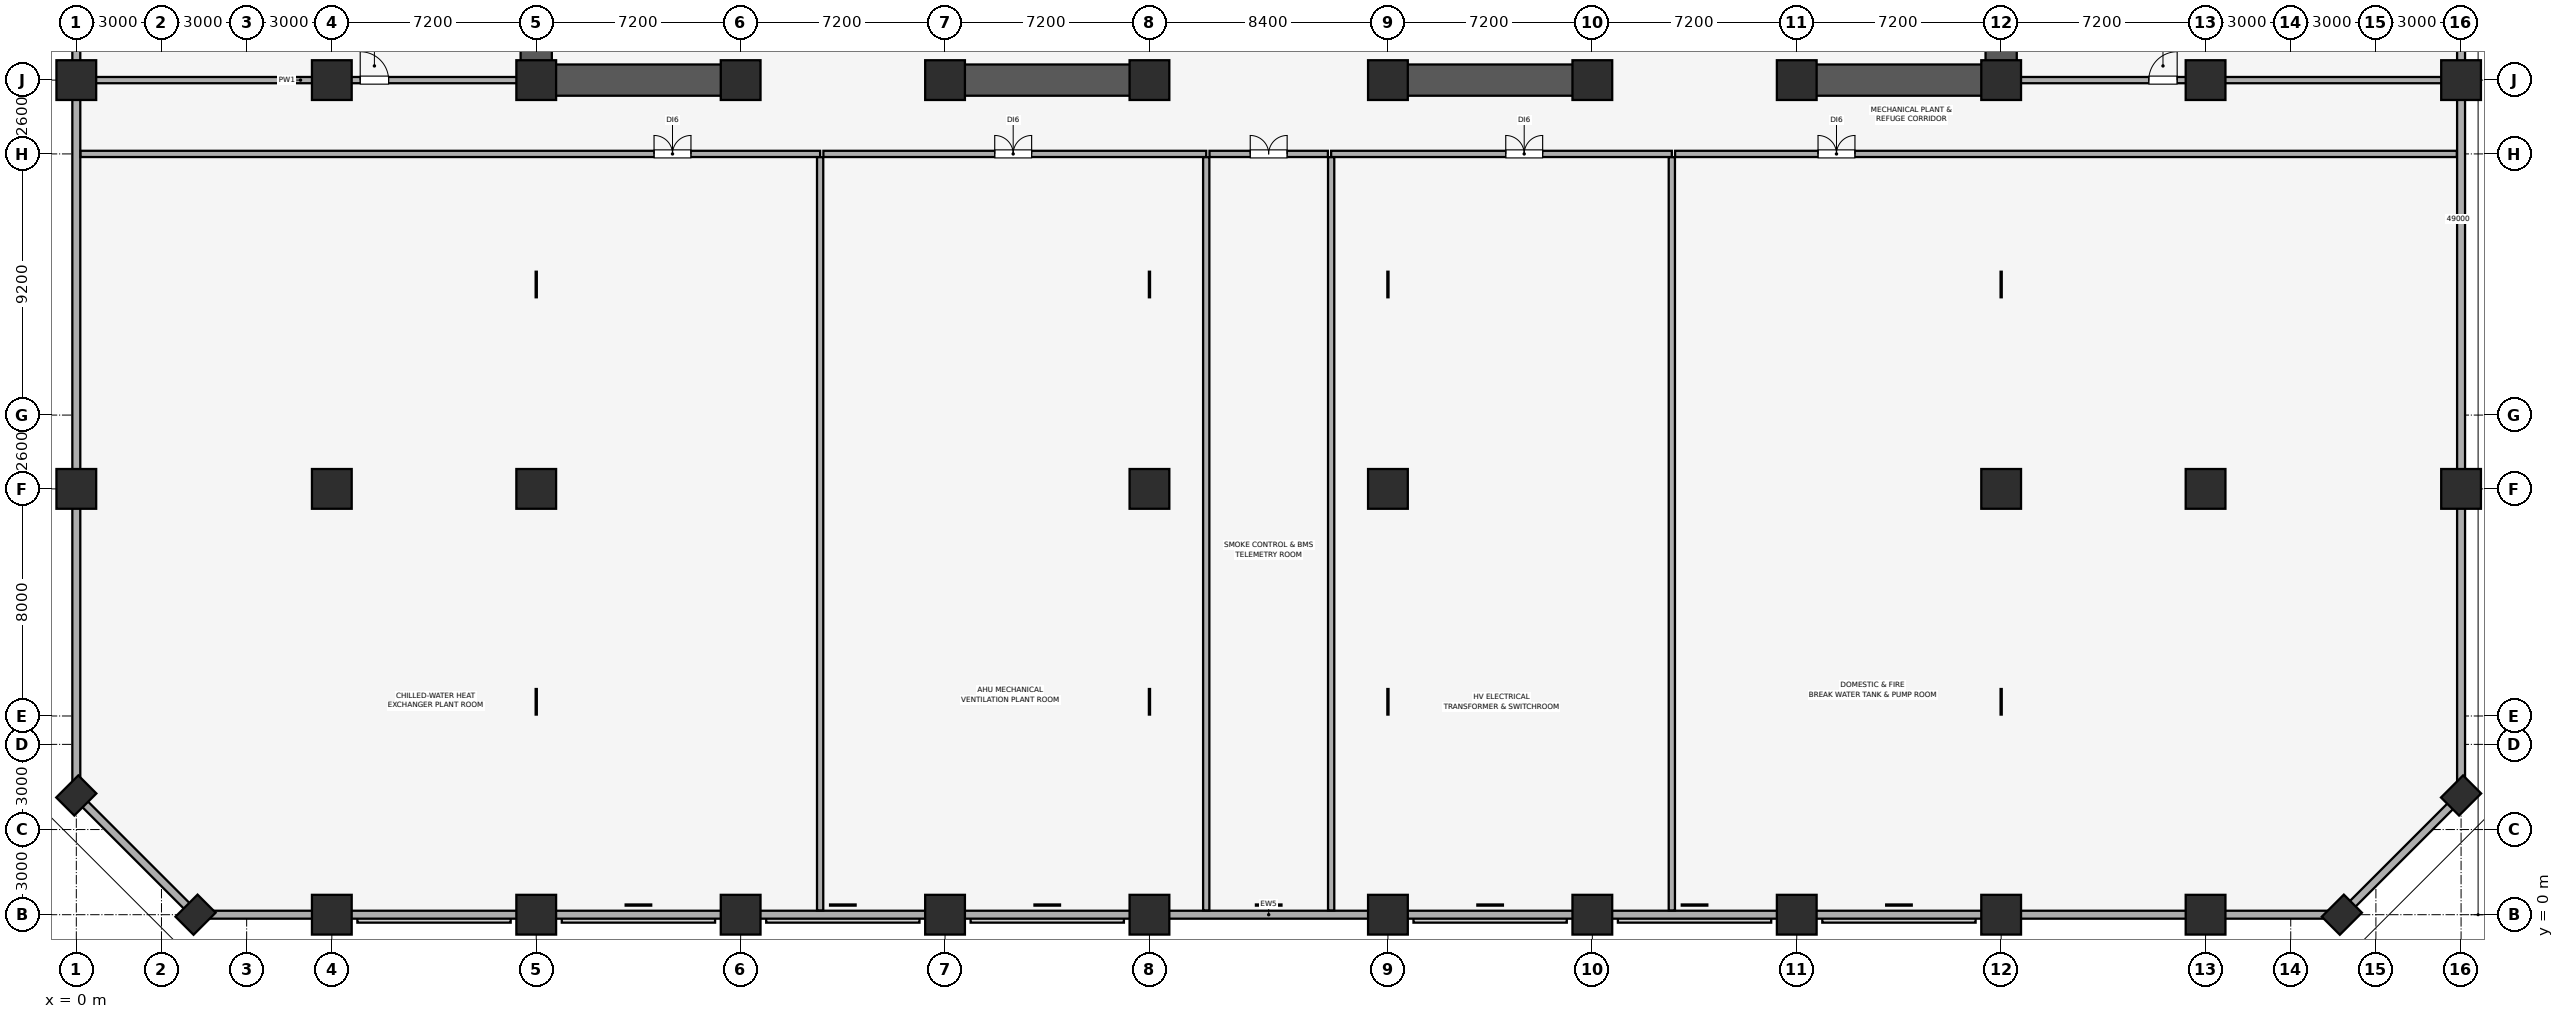
"""IFC4 building model, lengths in metres.
Left out: names, types, materials, properties, quantities, classifications, styles, units other than length and angle.
Written with IfcOpenShell. Run it as: python <this file> out.ifc"""

import sys

from ifc_helpers import new_model, si_unit, direction, frame, frame_2d, origin, origin_2d, place, context, subcontext, project, spatial, rectangle, extrude, element, fill, save


model = new_model("IFC4")
c1 = context("Model", 3, precision=1e-05, world=origin(), true_north=direction((0.0, 1.0)))
c2 = subcontext(c1, "Body", "Model", "MODEL_VIEW")
j1 = project(units=[si_unit("LENGTHUNIT", "METRE"), si_unit("PLANEANGLEUNIT", "RADIAN")], contexts=[c1])
p1 = place(None, origin())
s1 = spatial("IfcSite", under=j1, at=p1, CompositionType="ELEMENT")
p2 = place(p1, origin())
s2 = spatial("IfcBuilding", under=s1, at=p2, CompositionType="ELEMENT")
p3 = place(p2, frame((0.0, 0.0, 80.15)))
s3 = spatial("IfcBuildingStorey", under=s2, at=p3, CompositionType="ELEMENT", Elevation=80.15)
for number, where, z_axis, x_axis in (
    (1, (9.0, 0.0, 0.0), (0.0, 0.0, 1.0), (1.0, 0.0, 0.0)),
    (2, (16.2, 0.0, 0.0), (0.0, 0.0, 1.0), (1.0, 0.0, 0.0)),
    (3, (23.4, 0.0, 0.0), (0.0, 0.0, 1.0), (1.0, 0.0, 0.0)),
    (4, (30.6, 0.0, 0.0), (0.0, 0.0, 1.0), (1.0, 0.0, 0.0)),
    (5, (37.8, 0.0, 0.0), (0.0, 0.0, 1.0), (1.0, 0.0, 0.0)),
    (6, (46.2, 0.0, 0.0), (0.0, 0.0, 1.0), (1.0, 0.0, 0.0)),
    (7, (53.4, 0.0, 0.0), (0.0, 0.0, 1.0), (1.0, 0.0, 0.0)),
    (8, (60.6, 0.0, 0.0), (0.0, 0.0, 1.0), (1.0, 0.0, 0.0)),
    (9, (67.8, 0.0, 0.0), (0.0, 0.0, 1.0), (1.0, 0.0, 0.0)),
    (10, (75.0, 0.0, 0.0), (0.0, 0.0, 1.0), (1.0, 0.0, 0.0)),
    (11, (0.0, 15.0, 0.0), (0.0, 0.0, 1.0), (1.0, 0.0, 0.0)),
    (12, (84.0, 15.0, 0.0), (0.0, 0.0, 1.0), (1.0, 0.0, 0.0)),
    (13, (0.0, 29.4, 0.0), (0.0, 0.0, 1.0), (1.0, 0.0, 0.0)),
    (14, (84.0, 29.4, 0.0), (0.0, 0.0, 1.0), (1.0, 0.0, 0.0)),
):
    element("IfcColumn", number, at=place(p3, frame(where, z_axis=z_axis, x_axis=x_axis)), inside=s3, PredefinedType="COLUMN", context=c2, shape_type="SweptSolid", body=[
        extrude(rectangle(XDim=1.4, YDim=1.4, at=origin_2d()), origin(), (0.0, 0.0, 1.0), 5.16),
    ])
for number, where, z_axis, x_axis in (
    (15, (4.2, 0.0, 0.0), (0.0, 0.0, 1.0), (0.707, 0.707, 0.0)),
    (16, (79.8, 0.0, 0.0), (0.0, 0.0, 1.0), (0.707, 0.707, 0.0)),
    (17, (84.0, 4.2, 0.0), (0.0, 0.0, 1.0), (0.707, 0.707, 0.0)),
    (18, (0.0, 4.2, 0.0), (0.0, 0.0, 1.0), (0.707, 0.707, 0.0)),
):
    element("IfcColumn", number, at=place(p3, frame(where, z_axis=z_axis, x_axis=x_axis)), inside=s3, PredefinedType="PILASTER", context=c2, shape_type="SweptSolid", body=[
        extrude(rectangle(XDim=1.1, YDim=0.9, at=origin_2d()), origin(), (0.0, 0.0, 1.0), 5.16),
    ])
for number, where, z_axis, x_axis in (
    (19, (9.0, 15.0, 0.0), (0.0, 0.0, 1.0), (1.0, 0.0, 0.0)),
    (20, (16.2, 15.0, 0.0), (0.0, 0.0, 1.0), (1.0, 0.0, 0.0)),
    (21, (37.8, 15.0, 0.0), (0.0, 0.0, 1.0), (1.0, 0.0, 0.0)),
    (22, (46.2, 15.0, 0.0), (0.0, 0.0, 1.0), (1.0, 0.0, 0.0)),
    (23, (67.8, 15.0, 0.0), (0.0, 0.0, 1.0), (1.0, 0.0, 0.0)),
    (24, (75.0, 15.0, 0.0), (0.0, 0.0, 1.0), (1.0, 0.0, 0.0)),
    (25, (9.0, 29.4, 0.0), (0.0, 0.0, 1.0), (1.0, 0.0, 0.0)),
    (26, (16.2, 29.4, 0.0), (0.0, 0.0, 1.0), (1.0, 0.0, 0.0)),
    (27, (23.4, 29.4, 0.0), (0.0, 0.0, 1.0), (1.0, 0.0, 0.0)),
    (28, (30.6, 29.4, 0.0), (0.0, 0.0, 1.0), (1.0, 0.0, 0.0)),
    (29, (37.8, 29.4, 0.0), (0.0, 0.0, 1.0), (1.0, 0.0, 0.0)),
    (30, (46.2, 29.4, 0.0), (0.0, 0.0, 1.0), (1.0, 0.0, 0.0)),
    (31, (53.4, 29.4, 0.0), (0.0, 0.0, 1.0), (1.0, 0.0, 0.0)),
    (32, (60.6, 29.4, 0.0), (0.0, 0.0, 1.0), (1.0, 0.0, 0.0)),
    (33, (67.8, 29.4, 0.0), (0.0, 0.0, 1.0), (1.0, 0.0, 0.0)),
    (34, (75.0, 29.4, 0.0), (0.0, 0.0, 1.0), (1.0, 0.0, 0.0)),
):
    element("IfcColumn", number, at=place(p3, frame(where, z_axis=z_axis, x_axis=x_axis)), inside=s3, PredefinedType="COLUMN", context=c2, shape_type="SweptSolid", body=[
        extrude(rectangle(XDim=1.4, YDim=1.4, at=origin_2d()), origin(), (0.0, 0.0, 1.0), 5.16),
    ])
p4 = place(p3, frame((4.2, 0.0, 0.0), z_axis=(0.0, 0.0, 1.0), x_axis=(1.0, 0.0, 0.0)))
e35 = element("IfcWall", 35, at=p4, inside=s3, PredefinedType="SOLIDWALL", context=c2, shape_type="SweptSolid", body=[
    extrude(rectangle(XDim=75.6, YDim=0.28, at=frame_2d((37.8, 0.0))), origin(), (0.0, 0.0, 1.0), 4.21),
])
p5 = place(p3, frame((79.8, 0.0, 0.0), z_axis=(0.0, 0.0, 1.0), x_axis=(0.707106781187, 0.707106781187, 0.0)))
e36 = element("IfcWall", 36, at=p5, inside=s3, PredefinedType="SOLIDWALL", context=c2, shape_type="SweptSolid", body=[
    extrude(rectangle(XDim=5.94, YDim=0.28, at=frame_2d((2.97, 0.0))), origin(), (0.0, 0.0, 1.0), 4.21),
])
for number, where, z_axis, x_axis in (
    (37, (84.0, 4.2, 0.0), (0.0, 0.0, 1.0), (0.0, 1.0, 0.0)),
    (38, (0.0, 44.8, 0.0), (0.0, 0.0, 1.0), (0.0, -1.0, 0.0)),
):
    element("IfcWall", number, at=place(p3, frame(where, z_axis=z_axis, x_axis=x_axis)), inside=s3, PredefinedType="SOLIDWALL", context=c2, shape_type="SweptSolid", body=[
        extrude(rectangle(XDim=40.6, YDim=0.28, at=frame_2d((20.3, 0.0))), origin(), (0.0, 0.0, 1.0), 4.21),
    ])
p6 = place(p3, frame((0.0, 4.2, 0.0), z_axis=(0.0, 0.0, 1.0), x_axis=(0.707106781187, -0.707106781187, 0.0)))
e39 = element("IfcWall", 39, at=p6, inside=s3, PredefinedType="SOLIDWALL", context=c2, shape_type="SweptSolid", body=[
    extrude(rectangle(XDim=5.94, YDim=0.28, at=frame_2d((2.97, 0.0))), origin(), (0.0, 0.0, 1.0), 4.21),
])
for number, where, z_axis, x_axis in (
    (40, (16.2, 29.4, 0.0), (0.0, 0.0, 1.0), (0.0, 1.0, 0.0)),
    (41, (67.8, 29.4, 0.0), (0.0, 0.0, 1.0), (0.0, 1.0, 0.0)),
):
    element("IfcWall", number, at=place(p3, frame(where, z_axis=z_axis, x_axis=x_axis)), inside=s3, PredefinedType="SHEAR", context=c2, shape_type="SweptSolid", body=[
        extrude(rectangle(XDim=19.2, YDim=1.1, at=frame_2d((9.6, 0.0))), origin(), (0.0, 0.0, 1.0), 5.16),
    ])
p7 = place(p3, frame((16.755, 29.4, 0.0), z_axis=(0.0, 0.0, 1.0), x_axis=(1.0, 0.0, 0.0)))
e42 = element("IfcWall", 42, at=p7, inside=s3, PredefinedType="SHEAR", context=c2, shape_type="SweptSolid", body=[
    extrude(rectangle(XDim=6.845, YDim=1.1, at=frame_2d((3.423, 0.0))), origin(), (0.0, 0.0, 1.0), 5.16),
])
for number, where, z_axis, x_axis in (
    (43, (30.4, 29.4, 0.0), (0.0, 0.0, 1.0), (1.0, 0.0, 0.0)),
    (44, (46.0, 29.4, 0.0), (0.0, 0.0, 1.0), (1.0, 0.0, 0.0)),
):
    element("IfcWall", number, at=place(p3, frame(where, z_axis=z_axis, x_axis=x_axis)), inside=s3, PredefinedType="SHEAR", context=c2, shape_type="SweptSolid", body=[
        extrude(rectangle(XDim=7.6, YDim=1.1, at=frame_2d((3.8, 0.0))), origin(), (0.0, 0.0, 1.0), 5.16),
    ])
p8 = place(p3, frame((60.4, 29.4, 0.0), z_axis=(0.0, 0.0, 1.0), x_axis=(1.0, 0.0, 0.0)))
e45 = element("IfcWall", 45, at=p8, inside=s3, PredefinedType="SHEAR", context=c2, shape_type="SweptSolid", body=[
    extrude(rectangle(XDim=6.845, YDim=1.1, at=frame_2d((3.423, 0.0))), origin(), (0.0, 0.0, 1.0), 5.16),
])
p9 = place(p3, frame((0.15, 29.4, 0.0), z_axis=(0.0, 0.0, 1.0), x_axis=(1.0, 0.0, 0.0)))
e46 = element("IfcWall", 46, at=p9, inside=s3, PredefinedType="PARTITIONING", context=c2, shape_type="SweptSolid", body=[
    extrude(rectangle(XDim=15.495, YDim=0.22, at=frame_2d((7.748, 0.0))), origin(), (0.0, 0.0, 1.0), 4.51),
])
p10 = place(p9, frame((9.85, 0.0, 0.0)))
e47 = element("IfcOpeningElement", 47, at=p10, cuts=e46, PredefinedType="OPENING", context=c2, shape_type="SweptSolid", body=[
    extrude(rectangle(XDim=1.0, YDim=2.15, at=frame_2d((0.5, 1.075))), frame((0.0, 0.12, 0.0), z_axis=(0.0, -1.0, 0.0), x_axis=(1.0, 0.0, 0.0)), (0.0, 0.0, 1.0), 0.24),
])
p11 = place(p3, frame((68.355, 29.4, 0.0), z_axis=(0.0, 0.0, 1.0), x_axis=(1.0, 0.0, 0.0)))
e48 = element("IfcWall", 48, at=p11, inside=s3, PredefinedType="PARTITIONING", context=c2, shape_type="SweptSolid", body=[
    extrude(rectangle(XDim=15.495, YDim=0.22, at=frame_2d((7.748, 0.0))), origin(), (0.0, 0.0, 1.0), 4.51),
])
p12 = place(p11, frame((4.645, 0.0, 0.0)))
e49 = element("IfcOpeningElement", 49, at=p12, cuts=e48, PredefinedType="OPENING", context=c2, shape_type="SweptSolid", body=[
    extrude(rectangle(XDim=1.0, YDim=2.15, at=frame_2d((0.5, 1.075))), frame((0.0, 0.12, 0.0), z_axis=(0.0, -1.0, 0.0), x_axis=(1.0, 0.0, 0.0)), (0.0, 0.0, 1.0), 0.24),
])
p13 = place(p3, frame((0.15, 26.8, 0.0), z_axis=(0.0, 0.0, 1.0), x_axis=(1.0, 0.0, 0.0)))
e50 = element("IfcWall", 50, at=p13, inside=s3, PredefinedType="PARTITIONING", context=c2, shape_type="SweptSolid", body=[
    extrude(rectangle(XDim=26.05, YDim=0.22, at=frame_2d((13.025, 0.0))), origin(), (0.0, 0.0, 1.0), 5.16),
])
p14 = place(p13, frame((20.2, 0.0, 0.0)))
e51 = element("IfcOpeningElement", 51, at=p14, cuts=e50, PredefinedType="OPENING", context=c2, shape_type="SweptSolid", body=[
    extrude(rectangle(XDim=1.3, YDim=2.2, at=frame_2d((0.65, 1.1))), frame((0.0, 0.12, 0.0), z_axis=(0.0, -1.0, 0.0), x_axis=(1.0, 0.0, 0.0)), (0.0, 0.0, 1.0), 0.24),
])
p15 = place(p3, frame((26.2, 0.15, 0.0), z_axis=(0.0, 0.0, 1.0), x_axis=(0.0, 1.0, 0.0)))
e52 = element("IfcWall", 52, at=p15, inside=s3, PredefinedType="PARTITIONING", context=c2, shape_type="SweptSolid", body=[
    extrude(rectangle(XDim=26.535, YDim=0.22, at=frame_2d((13.268, 0.0))), origin(), (0.0, 0.0, 1.0), 5.16),
])
p16 = place(p3, frame((26.315, 26.8, 0.0), z_axis=(0.0, 0.0, 1.0), x_axis=(1.0, 0.0, 0.0)))
e53 = element("IfcWall", 53, at=p16, inside=s3, PredefinedType="PARTITIONING", context=c2, shape_type="SweptSolid", body=[
    extrude(rectangle(XDim=13.485, YDim=0.22, at=frame_2d((6.743, 0.0))), origin(), (0.0, 0.0, 1.0), 5.16),
])
p17 = place(p16, frame((6.035, 0.0, 0.0)))
e54 = element("IfcOpeningElement", 54, at=p17, cuts=e53, PredefinedType="OPENING", context=c2, shape_type="SweptSolid", body=[
    extrude(rectangle(XDim=1.3, YDim=2.2, at=frame_2d((0.65, 1.1))), frame((0.0, 0.12, 0.0), z_axis=(0.0, -1.0, 0.0), x_axis=(1.0, 0.0, 0.0)), (0.0, 0.0, 1.0), 0.24),
])
p18 = place(p3, frame((39.8, 0.15, 0.0), z_axis=(0.0, 0.0, 1.0), x_axis=(0.0, 1.0, 0.0)))
e55 = element("IfcWall", 55, at=p18, inside=s3, PredefinedType="PARTITIONING", context=c2, shape_type="SweptSolid", body=[
    extrude(rectangle(XDim=26.535, YDim=0.22, at=frame_2d((13.268, 0.0))), origin(), (0.0, 0.0, 1.0), 5.16),
])
p19 = place(p3, frame((44.2, 26.8, 0.0), z_axis=(0.0, 0.0, 1.0), x_axis=(1.0, 0.0, 0.0)))
e56 = element("IfcWall", 56, at=p19, inside=s3, PredefinedType="PARTITIONING", context=c2, shape_type="SweptSolid", body=[
    extrude(rectangle(XDim=12.0, YDim=0.22, at=frame_2d((6.0, 0.0))), origin(), (0.0, 0.0, 1.0), 5.16),
])
p20 = place(p19, frame((6.15, 0.0, 0.0)))
e57 = element("IfcOpeningElement", 57, at=p20, cuts=e56, PredefinedType="OPENING", context=c2, shape_type="SweptSolid", body=[
    extrude(rectangle(XDim=1.3, YDim=2.2, at=frame_2d((0.65, 1.1))), frame((0.0, 0.12, 0.0), z_axis=(0.0, -1.0, 0.0), x_axis=(1.0, 0.0, 0.0)), (0.0, 0.0, 1.0), 0.24),
])
for number, where, z_axis, x_axis in (
    (58, (44.2, 0.15, 0.0), (0.0, 0.0, 1.0), (0.0, 1.0, 0.0)),
    (59, (56.2, 0.15, 0.0), (0.0, 0.0, 1.0), (0.0, 1.0, 0.0)),
):
    element("IfcWall", number, at=place(p3, frame(where, z_axis=z_axis, x_axis=x_axis)), inside=s3, PredefinedType="PARTITIONING", context=c2, shape_type="SweptSolid", body=[
        extrude(rectangle(XDim=26.535, YDim=0.22, at=frame_2d((13.268, 0.0))), origin(), (0.0, 0.0, 1.0), 5.16),
    ])
p21 = place(p3, frame((56.315, 26.8, 0.0), z_axis=(0.0, 0.0, 1.0), x_axis=(1.0, 0.0, 0.0)))
e60 = element("IfcWall", 60, at=p21, inside=s3, PredefinedType="PARTITIONING", context=c2, shape_type="SweptSolid", body=[
    extrude(rectangle(XDim=27.535, YDim=0.22, at=frame_2d((13.768, 0.0))), origin(), (0.0, 0.0, 1.0), 5.16),
])
p22 = place(p21, frame((5.035, 0.0, 0.0)))
e61 = element("IfcOpeningElement", 61, at=p22, cuts=e60, PredefinedType="OPENING", context=c2, shape_type="SweptSolid", body=[
    extrude(rectangle(XDim=1.3, YDim=2.2, at=frame_2d((0.65, 1.1))), frame((0.0, 0.12, 0.0), z_axis=(0.0, -1.0, 0.0), x_axis=(1.0, 0.0, 0.0)), (0.0, 0.0, 1.0), 0.24),
])
p23 = place(p3, frame((39.915, 26.8, 0.0), z_axis=(0.0, 0.0, 1.0), x_axis=(1.0, 0.0, 0.0)))
e62 = element("IfcWall", 62, at=p23, inside=s3, PredefinedType="PARTITIONING", context=c2, shape_type="SweptSolid", body=[
    extrude(rectangle(XDim=4.17, YDim=0.22, at=frame_2d((2.085, 0.0))), origin(), (0.0, 0.0, 1.0), 5.16),
])
p24 = place(p23, frame((1.435, 0.0, 0.0)))
e63 = element("IfcOpeningElement", 63, at=p24, cuts=e62, PredefinedType="OPENING", context=c2, shape_type="SweptSolid", body=[
    extrude(rectangle(XDim=1.3, YDim=2.2, at=frame_2d((0.65, 1.1))), frame((0.0, 0.12, 0.0), z_axis=(0.0, -1.0, 0.0), x_axis=(1.0, 0.0, 0.0)), (0.0, 0.0, 1.0), 0.24),
])
p25 = place(p10, origin())
e64 = element("IfcDoor", 64, at=p25, inside=s3, OperationType="SINGLE_SWING_LEFT", PredefinedType="DOOR", context=c2, shape_type="SweptSolid", body=[
    extrude(rectangle(XDim=1.0, YDim=2.15, at=frame_2d((0.5, 1.075))), frame((0.0, 0.025, 0.0), z_axis=(0.0, -1.0, 0.0), x_axis=(1.0, 0.0, 0.0)), (0.0, 0.0, 1.0), 0.05),
])
fill(e47, e64)
p26 = place(p12, origin())
e65 = element("IfcDoor", 65, at=p26, inside=s3, OperationType="SINGLE_SWING_RIGHT", PredefinedType="DOOR", context=c2, shape_type="SweptSolid", body=[
    extrude(rectangle(XDim=1.0, YDim=2.15, at=frame_2d((0.5, 1.075))), frame((0.0, 0.025, 0.0), z_axis=(0.0, -1.0, 0.0), x_axis=(1.0, 0.0, 0.0)), (0.0, 0.0, 1.0), 0.05),
])
fill(e49, e65)
p27 = place(p14, origin())
e66 = element("IfcDoor", 66, at=p27, inside=s3, OperationType="DOUBLE_DOOR_SINGLE_SWING", PredefinedType="DOOR", context=c2, shape_type="SweptSolid", body=[
    extrude(rectangle(XDim=1.3, YDim=2.2, at=frame_2d((0.65, 1.1))), frame((0.0, 0.025, 0.0), z_axis=(0.0, -1.0, 0.0), x_axis=(1.0, 0.0, 0.0)), (0.0, 0.0, 1.0), 0.05),
])
fill(e51, e66)
p28 = place(p17, origin())
e67 = element("IfcDoor", 67, at=p28, inside=s3, OperationType="DOUBLE_DOOR_SINGLE_SWING", PredefinedType="DOOR", context=c2, shape_type="SweptSolid", body=[
    extrude(rectangle(XDim=1.3, YDim=2.2, at=frame_2d((0.65, 1.1))), frame((0.0, 0.025, 0.0), z_axis=(0.0, -1.0, 0.0), x_axis=(1.0, 0.0, 0.0)), (0.0, 0.0, 1.0), 0.05),
])
fill(e54, e67)
p29 = place(p20, origin())
e68 = element("IfcDoor", 68, at=p29, inside=s3, OperationType="DOUBLE_DOOR_SINGLE_SWING", PredefinedType="DOOR", context=c2, shape_type="SweptSolid", body=[
    extrude(rectangle(XDim=1.3, YDim=2.2, at=frame_2d((0.65, 1.1))), frame((0.0, 0.025, 0.0), z_axis=(0.0, -1.0, 0.0), x_axis=(1.0, 0.0, 0.0)), (0.0, 0.0, 1.0), 0.05),
])
fill(e57, e68)
p30 = place(p22, origin())
e69 = element("IfcDoor", 69, at=p30, inside=s3, OperationType="DOUBLE_DOOR_SINGLE_SWING", PredefinedType="DOOR", context=c2, shape_type="SweptSolid", body=[
    extrude(rectangle(XDim=1.3, YDim=2.2, at=frame_2d((0.65, 1.1))), frame((0.0, 0.025, 0.0), z_axis=(0.0, -1.0, 0.0), x_axis=(1.0, 0.0, 0.0)), (0.0, 0.0, 1.0), 0.05),
])
fill(e61, e69)
p31 = place(p24, origin())
e70 = element("IfcDoor", 70, at=p31, inside=s3, OperationType="DOUBLE_DOOR_SINGLE_SWING", PredefinedType="DOOR", context=c2, shape_type="SweptSolid", body=[
    extrude(rectangle(XDim=1.3, YDim=2.2, at=frame_2d((0.65, 1.1))), frame((0.0, 0.025, 0.0), z_axis=(0.0, -1.0, 0.0), x_axis=(1.0, 0.0, 0.0)), (0.0, 0.0, 1.0), 0.05),
])
fill(e63, e70)
save(model, sys.argv[1])
